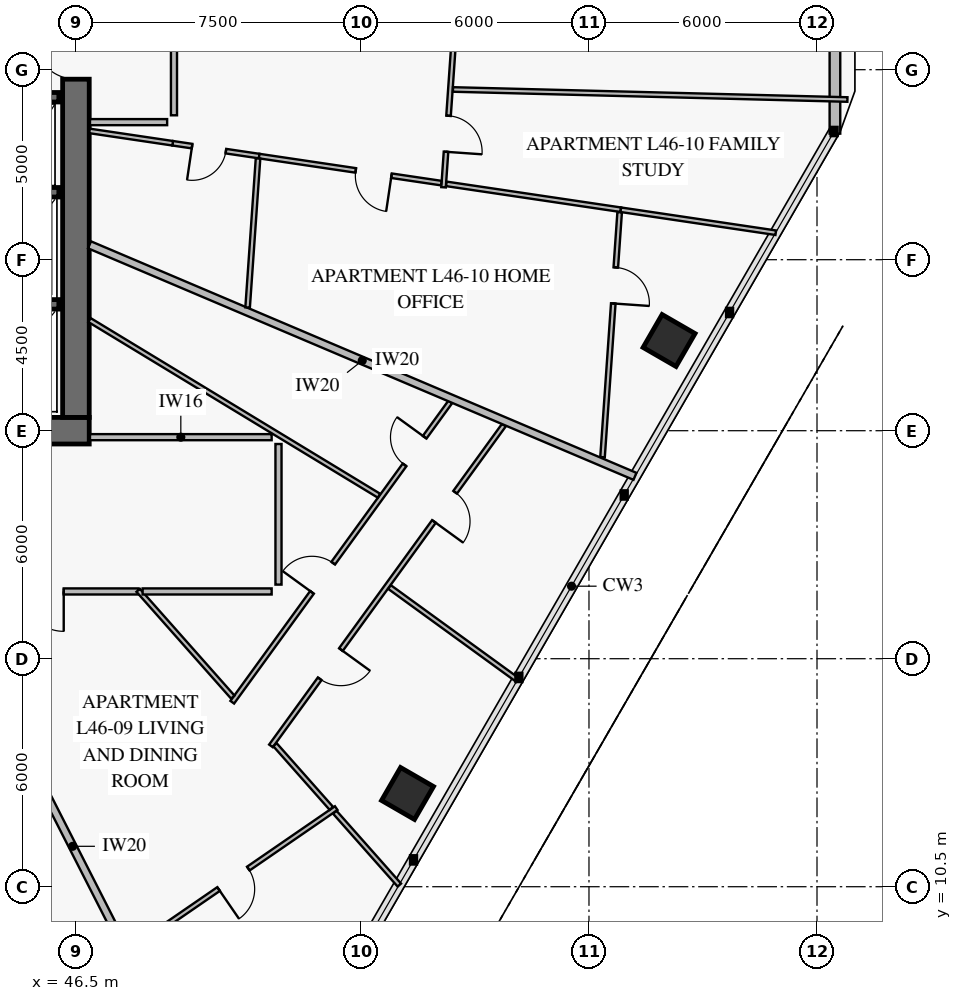
"""IFC4 building model, lengths in metres.
Left out: names, types, materials, properties, quantities, classifications, styles, units other than length and angle.
Written with IfcOpenShell. Run it as: python <this file> out.ifc"""

import sys

from ifc_helpers import new_model, si_unit, direction, frame, frame_2d, origin, origin_2d, place, context, subcontext, project, spatial, rectangle, extrude, element, fill, save


model = new_model("IFC4")
c1 = context("Model", 3, precision=1e-05, world=origin(), true_north=direction((0.0, 1.0)))
c2 = subcontext(c1, "Body", "Model", "MODEL_VIEW")
j1 = project(units=[si_unit("LENGTHUNIT", "METRE"), si_unit("PLANEANGLEUNIT", "RADIAN")], contexts=[c1])
p1 = place(None, origin())
s1 = spatial("IfcSite", under=j1, at=p1, CompositionType="ELEMENT")
p2 = place(p1, origin())
s2 = spatial("IfcBuilding", under=s1, at=p2, CompositionType="ELEMENT")
p3 = place(p2, frame((0.0, 0.0, 184.6)))
s3 = spatial("IfcBuildingStorey", under=s2, at=p3, CompositionType="ELEMENT", Elevation=184.6)
p4 = place(p3, frame((37.35, 22.5, 0.0), z_axis=(0.0, 0.0, 1.0), x_axis=(1.0, 0.0, 0.0)))
e1 = element("IfcWall", 1, at=p4, inside=s3, PredefinedType="SHEAR", context=c2, shape_type="SweptSolid", body=[
    extrude(rectangle(XDim=9.5, YDim=0.7, at=frame_2d((4.75, 0.0))), origin(), (0.0, 0.0, 1.0), 3.8),
])
p5 = place(p4, frame((3.95, 0.0, 0.0)))
e2 = element("IfcOpeningElement", 2, at=p5, cuts=e1, PredefinedType="OPENING", context=c2, shape_type="SweptSolid", body=[
    extrude(rectangle(XDim=1.5, YDim=2.15, at=frame_2d((0.75, 1.075))), frame((0.0, 0.362, 0.0), z_axis=(0.0, -1.0, 0.0), x_axis=(1.0, 0.0, 0.0)), (0.0, 0.0, 1.0), 0.724),
])
p6 = place(p3, frame((46.5, 22.85, 0.0), z_axis=(0.0, 0.0, 1.0), x_axis=(0.0, 1.0, 0.0)))
e3 = element("IfcWall", 3, at=p6, inside=s3, PredefinedType="SHEAR", context=c2, shape_type="SweptSolid", body=[
    extrude(rectangle(XDim=18.3, YDim=0.7, at=frame_2d((9.15, 0.0))), origin(), (0.0, 0.0, 1.0), 3.8),
])
p7 = place(p6, frame((8.9, 0.0, 0.0)))
e4 = element("IfcOpeningElement", 4, at=p7, cuts=e3, PredefinedType="OPENING", context=c2, shape_type="SweptSolid", body=[
    extrude(rectangle(XDim=1.1, YDim=2.15, at=frame_2d((0.55, 1.075))), frame((0.0, 0.362, 0.0), z_axis=(0.0, -1.0, 0.0), x_axis=(1.0, 0.0, 0.0)), (0.0, 0.0, 1.0), 0.724),
])
for number, where, z_axis, x_axis in (
    (5, (55.226, 12.953, 0.0), (0.0, 0.0, 1.0), (0.5, 0.866, 0.0)),
    (6, (62.108, 24.874, 0.0), (0.0, 0.0, 1.0), (0.5, 0.866, 0.0)),
):
    element("IfcColumn", number, at=place(p3, frame(where, z_axis=z_axis, x_axis=x_axis)), inside=s3, PredefinedType="COLUMN", context=c2, shape_type="SweptSolid", body=[
        extrude(rectangle(XDim=1.0, YDim=1.0, at=origin_2d()), origin(), (0.0, 0.0, 1.0), 3.55),
    ])
p8 = place(p3, frame((66.472, 33.683, 0.0), z_axis=(0.0, 0.0, 1.0), x_axis=(0.0, -1.0, 0.0)))
e7 = element("IfcWall", 7, at=p8, inside=s3, PredefinedType="SOLIDWALL", context=c2, shape_type="SweptSolid", body=[
    extrude(rectangle(XDim=3.365, YDim=0.28, at=frame_2d((1.683, 0.0))), origin(), (0.0, 0.0, 1.0), 3.55),
])
p9 = place(p3, frame((25.95, 31.275, 0.0), z_axis=(0.0, 0.0, 1.0), x_axis=(1.0, 0.0, 0.0)))
e8 = element("IfcWall", 8, at=p9, inside=s3, PredefinedType="SOLIDWALL", context=c2, shape_type="SweptSolid", body=[
    extrude(rectangle(XDim=20.1, YDim=0.25, at=frame_2d((10.05, 0.0))), origin(), (0.0, 0.0, 1.0), 3.8),
])
p10 = place(p9, frame((2.6, 0.0, 0.0)))
e9 = element("IfcOpeningElement", 9, at=p10, cuts=e8, PredefinedType="OPENING", context=c2, shape_type="SweptSolid", body=[
    extrude(rectangle(XDim=1.1, YDim=2.15, at=frame_2d((0.55, 1.075))), frame((0.0, 0.137, 0.0), z_axis=(0.0, -1.0, 0.0), x_axis=(1.0, 0.0, 0.0)), (0.0, 0.0, 1.0), 0.274),
])
p11 = place(p9, frame((10.6, 0.0, 0.0)))
e10 = element("IfcOpeningElement", 10, at=p11, cuts=e8, PredefinedType="OPENING", context=c2, shape_type="SweptSolid", body=[
    extrude(rectangle(XDim=1.1, YDim=2.15, at=frame_2d((0.55, 1.075))), frame((0.0, 0.137, 0.0), z_axis=(0.0, -1.0, 0.0), x_axis=(1.0, 0.0, 0.0)), (0.0, 0.0, 1.0), 0.274),
])
p12 = place(p9, frame((16.35, 0.0, 0.0)))
e11 = element("IfcOpeningElement", 11, at=p12, cuts=e8, PredefinedType="OPENING", context=c2, shape_type="SweptSolid", body=[
    extrude(rectangle(XDim=1.1, YDim=2.15, at=frame_2d((0.55, 1.075))), frame((0.0, 0.137, 0.0), z_axis=(0.0, -1.0, 0.0), x_axis=(1.0, 0.0, 0.0)), (0.0, 0.0, 1.0), 0.274),
])
for number, where, z_axis, x_axis in (
    (12, (43.8, 25.825, 0.0), (0.0, 0.0, 1.0), (1.0, 0.0, 0.0)),
    (13, (43.8, 28.775, 0.0), (0.0, 0.0, 1.0), (1.0, 0.0, 0.0)),
):
    element("IfcWall", number, at=place(p3, frame(where, z_axis=z_axis, x_axis=x_axis)), inside=s3, PredefinedType="SOLIDWALL", context=c2, shape_type="SweptSolid", body=[
        extrude(rectangle(XDim=2.25, YDim=0.25, at=frame_2d((1.125, 0.0))), origin(), (0.0, 0.0, 1.0), 3.8),
    ])
p13 = place(p3, frame((47.94, 8.847, 0.0), z_axis=(0.0, 0.0, 1.0), x_axis=(0.823925822712, 0.566697660723, 0.0)))
e14 = element("IfcWall", 14, at=p13, inside=s3, PredefinedType="PARTITIONING", context=c2, shape_type="SweptSolid", body=[
    extrude(rectangle(XDim=6.566, YDim=0.12, at=frame_2d((3.283, 0.0))), origin(), (0.0, 0.0, 1.0), 2.87),
])
p14 = place(p13, frame((2.808, 0.0, 0.0)))
e15 = element("IfcOpeningElement", 15, at=p14, cuts=e14, PredefinedType="OPENING", context=c2, shape_type="SweptSolid", body=[
    extrude(rectangle(XDim=0.95, YDim=2.1, at=frame_2d((0.475, 1.05))), frame((0.0, 0.072, 0.0), z_axis=(0.0, -1.0, 0.0), x_axis=(1.0, 0.0, 0.0)), (0.0, 0.0, 1.0), 0.144),
])
p15 = place(p3, frame((50.613, 15.355, 0.0), z_axis=(0.0, 0.0, 1.0), x_axis=(0.587519111836, 0.809210289867, 0.0)))
e16 = element("IfcWall", 16, at=p15, inside=s3, PredefinedType="PARTITIONING", context=c2, shape_type="SweptSolid", body=[
    extrude(rectangle(XDim=9.768, YDim=0.12, at=frame_2d((4.884, 0.0))), origin(), (0.0, 0.0, 1.0), 2.9),
])
p16 = place(p15, frame((3.572, 0.0, 0.0)))
e17 = element("IfcOpeningElement", 17, at=p16, cuts=e16, PredefinedType="OPENING", context=c2, shape_type="SweptSolid", body=[
    extrude(rectangle(XDim=0.95, YDim=2.1, at=frame_2d((0.475, 1.05))), frame((0.0, 0.072, 0.0), z_axis=(0.0, -1.0, 0.0), x_axis=(1.0, 0.0, 0.0)), (0.0, 0.0, 1.0), 0.144),
])
p17 = place(p15, frame((7.719, 0.0, 0.0)))
e18 = element("IfcOpeningElement", 18, at=p17, cuts=e16, PredefinedType="OPENING", context=c2, shape_type="SweptSolid", body=[
    extrude(rectangle(XDim=0.9, YDim=2.1, at=frame_2d((0.45, 1.05))), frame((0.0, 0.072, 0.0), z_axis=(0.0, -1.0, 0.0), x_axis=(1.0, 0.0, 0.0)), (0.0, 0.0, 1.0), 0.144),
])
p18 = place(p3, frame((51.632, 14.205, 0.0), z_axis=(0.0, 0.0, 1.0), x_axis=(0.587503568884, 0.809221574446, 0.0)))
e19 = element("IfcWall", 19, at=p18, inside=s3, PredefinedType="PARTITIONING", context=c2, shape_type="SweptSolid", body=[
    extrude(rectangle(XDim=10.432, YDim=0.12, at=frame_2d((5.216, 0.0))), origin(), (0.0, 0.0, 1.0), 2.9),
])
p19 = place(p18, frame((2.183, 0.0, 0.0)))
e20 = element("IfcOpeningElement", 20, at=p19, cuts=e19, PredefinedType="OPENING", context=c2, shape_type="SweptSolid", body=[
    extrude(rectangle(XDim=0.95, YDim=2.1, at=frame_2d((0.475, 1.05))), frame((0.0, 0.072, 0.0), z_axis=(0.0, -1.0, 0.0), x_axis=(1.0, 0.0, 0.0)), (0.0, 0.0, 1.0), 0.144),
])
p20 = place(p18, frame((7.299, 0.0, 0.0)))
e21 = element("IfcOpeningElement", 21, at=p20, cuts=e19, PredefinedType="OPENING", context=c2, shape_type="SweptSolid", body=[
    extrude(rectangle(XDim=0.95, YDim=2.1, at=frame_2d((0.475, 1.05))), frame((0.0, 0.072, 0.0), z_axis=(0.0, -1.0, 0.0), x_axis=(1.0, 0.0, 0.0)), (0.0, 0.0, 1.0), 0.144),
])
p21 = place(p3, frame((43.17, 18.27, 0.0), z_axis=(0.0, 0.0, 1.0), x_axis=(1.0, 0.0, 0.0)))
e22 = element("IfcWall", 22, at=p21, inside=s3, PredefinedType="PARTITIONING", context=c2, shape_type="SweptSolid", body=[
    extrude(rectangle(XDim=4.968, YDim=0.16, at=frame_2d((2.484, 0.0))), origin(), (0.0, 0.0, 1.0), 3.55),
])
p22 = place(p21, frame((1.959, 0.0, 0.0)))
e23 = element("IfcOpeningElement", 23, at=p22, cuts=e22, PredefinedType="OPENING", context=c2, shape_type="SweptSolid", body=[
    extrude(rectangle(XDim=1.05, YDim=2.15, at=frame_2d((0.525, 1.075))), frame((0.0, 0.092, 0.0), z_axis=(0.0, -1.0, 0.0), x_axis=(1.0, 0.0, 0.0)), (0.0, 0.0, 1.0), 0.184),
])
p23 = place(p3, frame((56.173, 28.906, 0.0), z_axis=(0.0, 0.0, 1.0), x_axis=(0.069768607492, 0.997563201711, 0.0)))
e24 = element("IfcWall", 24, at=p23, inside=s3, PredefinedType="PARTITIONING", context=c2, shape_type="SweptSolid", body=[
    extrude(rectangle(XDim=8.591, YDim=0.12, at=frame_2d((4.295, 0.0))), origin(), (0.0, 0.0, 1.0), 3.55),
])
p24 = place(p23, frame((0.936, 0.0, 0.0)))
e25 = element("IfcOpeningElement", 25, at=p24, cuts=e24, PredefinedType="OPENING", context=c2, shape_type="SweptSolid", body=[
    extrude(rectangle(XDim=0.95, YDim=2.1, at=frame_2d((0.475, 1.05))), frame((0.0, 0.072, 0.0), z_axis=(0.0, -1.0, 0.0), x_axis=(1.0, 0.0, 0.0)), (0.0, 0.0, 1.0), 0.144),
])
p25 = place(p23, frame((4.991, 0.0, 0.0)))
e26 = element("IfcOpeningElement", 26, at=p25, cuts=e24, PredefinedType="OPENING", context=c2, shape_type="SweptSolid", body=[
    extrude(rectangle(XDim=0.95, YDim=2.1, at=frame_2d((0.475, 1.05))), frame((0.0, 0.072, 0.0), z_axis=(0.0, -1.0, 0.0), x_axis=(1.0, 0.0, 0.0)), (0.0, 0.0, 1.0), 0.144),
])
p26 = place(p3, frame((49.045, 30.064, 0.0), z_axis=(0.0, 0.0, 1.0), x_axis=(0.989173245812, -0.146752477897, 0.0)))
e27 = element("IfcWall", 27, at=p26, inside=s3, PredefinedType="PARTITIONING", context=c2, shape_type="SweptSolid", body=[
    extrude(rectangle(XDim=2.301, YDim=0.12, at=frame_2d((1.15, 0.0))), origin(), (0.0, 0.0, 1.0), 3.55),
])
p27 = place(p26, frame((0.516, 0.0, 0.0)))
e28 = element("IfcOpeningElement", 28, at=p27, cuts=e27, PredefinedType="OPENING", context=c2, shape_type="SweptSolid", body=[
    extrude(rectangle(XDim=0.9, YDim=2.1, at=frame_2d((0.45, 1.05))), frame((0.0, 0.072, 0.0), z_axis=(0.0, -1.0, 0.0), x_axis=(1.0, 0.0, 0.0)), (0.0, 0.0, 1.0), 0.144),
])
p28 = place(p3, frame((51.321, 29.727, 0.0), z_axis=(0.0, 0.0, 1.0), x_axis=(0.98916147346, -0.146831806573, 0.0)))
e29 = element("IfcWall", 29, at=p28, inside=s3, PredefinedType="PARTITIONING", context=c2, shape_type="SweptSolid", body=[
    extrude(rectangle(XDim=4.844, YDim=0.12, at=frame_2d((2.422, 0.0))), origin(), (0.0, 0.0, 1.0), 3.55),
])
p29 = place(p28, frame((2.569, 0.0, 0.0)))
e30 = element("IfcOpeningElement", 30, at=p29, cuts=e29, PredefinedType="OPENING", context=c2, shape_type="SweptSolid", body=[
    extrude(rectangle(XDim=0.95, YDim=2.1, at=frame_2d((0.475, 1.05))), frame((0.0, 0.072, 0.0), z_axis=(0.0, -1.0, 0.0), x_axis=(1.0, 0.0, 0.0)), (0.0, 0.0, 1.0), 0.144),
])
p30 = place(p3, frame((56.247, 28.996, 0.0), z_axis=(0.0, 0.0, 1.0), x_axis=(0.989173212218, -0.146752704339, 0.0)))
e31 = element("IfcWall", 31, at=p30, inside=s3, PredefinedType="PARTITIONING", context=c2, shape_type="SweptSolid", body=[
    extrude(rectangle(XDim=4.64, YDim=0.12, at=frame_2d((2.32, 0.0))), origin(), (0.0, 0.0, 1.0), 3.55),
])
p31 = place(p3, frame((60.356, 21.803, 0.0), z_axis=(0.0, 0.0, 1.0), x_axis=(0.069770485872, 0.997563070337, 0.0)))
e32 = element("IfcWall", 32, at=p31, inside=s3, PredefinedType="PARTITIONING", context=c2, shape_type="SweptSolid", body=[
    extrude(rectangle(XDim=6.463, YDim=0.12, at=frame_2d((3.231, 0.0))), origin(), (0.0, 0.0, 1.0), 2.87),
])
p32 = place(p31, frame((4.055, 0.0, 0.0)))
e33 = element("IfcOpeningElement", 33, at=p32, cuts=e32, PredefinedType="OPENING", context=c2, shape_type="SweptSolid", body=[
    extrude(rectangle(XDim=0.95, YDim=2.1, at=frame_2d((0.475, 1.05))), frame((0.0, 0.072, 0.0), z_axis=(0.0, -1.0, 0.0), x_axis=(1.0, 0.0, 0.0)), (0.0, 0.0, 1.0), 0.144),
])
p33 = place(p3, frame((49.08, 30.8, 0.0), z_axis=(0.0, 0.0, 1.0), x_axis=(0.0, 1.0, 0.0)))
e34 = element("IfcWall", 34, at=p33, inside=s3, PredefinedType="PARTITIONING", context=c2, shape_type="SweptSolid", body=[
    extrude(rectangle(XDim=4.562, YDim=0.16, at=frame_2d((2.281, 0.0))), origin(), (0.0, 0.0, 1.0), 3.55),
])
p34 = place(p33, frame((1.756, 0.0, 0.0)))
e35 = element("IfcOpeningElement", 35, at=p34, cuts=e34, PredefinedType="OPENING", context=c2, shape_type="SweptSolid", body=[
    extrude(rectangle(XDim=1.05, YDim=2.15, at=frame_2d((0.525, 1.075))), frame((0.0, 0.092, 0.0), z_axis=(0.0, -1.0, 0.0), x_axis=(1.0, 0.0, 0.0)), (0.0, 0.0, 1.0), 0.184),
])
p35 = place(p3, frame((42.975, 18.31, 0.0), z_axis=(0.0, 0.0, 1.0), x_axis=(0.453997506489, -0.891002954037, 0.0)))
e36 = element("IfcWall", 36, at=p35, inside=s3, PredefinedType="PARTITIONING", context=c2, shape_type="SweptSolid", body=[
    extrude(rectangle(XDim=15.144, YDim=0.2, at=frame_2d((7.572, 0.0))), origin(), (0.0, 0.0, 1.0), 2.87),
])
p36 = place(p3, frame((46.858, 25.411, 0.0), z_axis=(0.0, 0.0, 1.0), x_axis=(0.854916867304, -0.518765023878, 0.0)))
e37 = element("IfcWall", 37, at=p36, inside=s3, PredefinedType="PARTITIONING", context=c2, shape_type="SweptSolid", body=[
    extrude(rectangle(XDim=8.909, YDim=0.12, at=frame_2d((4.455, 0.0))), origin(), (0.0, 0.0, 1.0), 3.15),
])
p37 = place(p3, frame((54.752, 18.386, 0.0), z_axis=(0.0, 0.0, 1.0), x_axis=(0.809234621537, -0.587485597531, 0.0)))
e38 = element("IfcWall", 38, at=p37, inside=s3, PredefinedType="PARTITIONING", context=c2, shape_type="SweptSolid", body=[
    extrude(rectangle(XDim=4.169, YDim=0.12, at=frame_2d((2.085, 0.0))), origin(), (0.0, 0.0, 1.0), 2.87),
])
p38 = place(p3, frame((48.138, 18.3, 0.0), z_axis=(0.0, 0.0, 1.0), x_axis=(0.663123743862, -0.748509786393, 0.0)))
e39 = element("IfcWall", 39, at=p38, inside=s3, PredefinedType="PARTITIONING", context=c2, shape_type="SweptSolid", body=[
    extrude(rectangle(XDim=3.754, YDim=0.12, at=frame_2d((1.877, 0.0))), origin(), (0.0, 0.0, 1.0), 3.55),
])
p39 = place(p3, frame((51.739, 14.236, 0.0), z_axis=(0.0, 0.0, 1.0), x_axis=(0.663176854864, -0.74846273065, 0.0)))
e40 = element("IfcWall", 40, at=p39, inside=s3, PredefinedType="PARTITIONING", context=c2, shape_type="SweptSolid", body=[
    extrude(rectangle(XDim=2.236, YDim=0.12, at=frame_2d((1.118, 0.0))), origin(), (0.0, 0.0, 1.0), 3.55),
])
p40 = place(p3, frame((53.312, 12.46, 0.0), z_axis=(0.0, 0.0, 1.0), x_axis=(0.663102409331, -0.748528686651, 0.0)))
e41 = element("IfcWall", 41, at=p40, inside=s3, PredefinedType="PARTITIONING", context=c2, shape_type="SweptSolid", body=[
    extrude(rectangle(XDim=2.561, YDim=0.12, at=frame_2d((1.28, 0.0))), origin(), (0.0, 0.0, 1.0), 2.87),
])
p41 = place(p3, frame((46.858, 27.391, 0.0), z_axis=(0.0, 0.0, 1.0), x_axis=(0.920508238271, -0.390723154261, 0.0)))
e42 = element("IfcWall", 42, at=p41, inside=s3, PredefinedType="PARTITIONING", context=c2, shape_type="SweptSolid", body=[
    extrude(rectangle(XDim=15.592, YDim=0.2, at=frame_2d((7.796, 0.0))), origin(), (0.0, 0.0, 1.0), 2.87),
])
p42 = place(p3, frame((56.421, 31.48, 0.0), z_axis=(0.0, 0.0, 1.0), x_axis=(0.999675097587, -0.025489198988, 0.0)))
e43 = element("IfcWall", 43, at=p42, inside=s3, PredefinedType="PARTITIONING", context=c2, shape_type="SweptSolid", body=[
    extrude(rectangle(XDim=10.383, YDim=0.12, at=frame_2d((5.191, 0.0))), origin(), (0.0, 0.0, 1.0), 2.87),
])
p43 = place(p3, frame((46.858, 30.389, 0.0), z_axis=(0.0, 0.0, 1.0), x_axis=(0.989161931015, -0.146828724135, 0.0)))
e44 = element("IfcWall", 44, at=p43, inside=s3, PredefinedType="PARTITIONING", context=c2, shape_type="SweptSolid", body=[
    extrude(rectangle(XDim=2.211, YDim=0.12, at=frame_2d((1.106, 0.0))), origin(), (0.0, 0.0, 1.0), 3.55),
])
p44 = place(p3, frame((60.837, 28.315, 0.0), z_axis=(0.0, 0.0, 1.0), x_axis=(0.989174828163, -0.146741811793, 0.0)))
e45 = element("IfcWall", 45, at=p44, inside=s3, PredefinedType="PARTITIONING", context=c2, shape_type="SweptSolid", body=[
    extrude(rectangle(XDim=4.123, YDim=0.12, at=frame_2d((2.062, 0.0))), origin(), (0.0, 0.0, 1.0), 2.87),
])
p45 = place(p3, frame((51.018, 25.743, 0.0), z_axis=(0.0, 0.0, 1.0), x_axis=(0.069719060605, 0.997566665736, 0.0)))
e46 = element("IfcWall", 46, at=p45, inside=s3, PredefinedType="PARTITIONING", context=c2, shape_type="SweptSolid", body=[
    extrude(rectangle(XDim=3.929, YDim=0.12, at=frame_2d((1.964, 0.0))), origin(), (0.0, 0.0, 1.0), 2.9),
])
p46 = place(p3, frame((51.65, 22.33, 0.0), z_axis=(0.0, 0.0, 1.0), x_axis=(-1.0, 0.0, 0.0)))
e47 = element("IfcWall", 47, at=p46, inside=s3, PredefinedType="PARTITIONING", context=c2, shape_type="SweptSolid", body=[
    extrude(rectangle(XDim=4.78, YDim=0.16, at=frame_2d((2.39, 0.0))), origin(), (0.0, 0.0, 1.0), 3.55),
])
p47 = place(p3, frame((51.83, 18.45, 0.0), z_axis=(0.0, 0.0, 1.0), x_axis=(0.0, 1.0, 0.0)))
e48 = element("IfcWall", 48, at=p47, inside=s3, PredefinedType="PARTITIONING", context=c2, shape_type="SweptSolid", body=[
    extrude(rectangle(XDim=3.7, YDim=0.16, at=frame_2d((1.85, 0.0))), origin(), (0.0, 0.0, 1.0), 3.15),
])
p48 = place(p3, frame((48.255, 18.27, 0.0), z_axis=(0.0, 0.0, 1.0), x_axis=(1.0, 0.0, 0.0)))
e49 = element("IfcWall", 49, at=p48, inside=s3, PredefinedType="PARTITIONING", context=c2, shape_type="SweptSolid", body=[
    extrude(rectangle(XDim=3.395, YDim=0.16, at=frame_2d((1.697, 0.0))), origin(), (0.0, 0.0, 1.0), 2.9),
])
p49 = place(p3, frame((46.87, 30.62, 0.0), z_axis=(0.0, 0.0, 1.0), x_axis=(1.0, 0.0, 0.0)))
e50 = element("IfcWall", 50, at=p49, inside=s3, PredefinedType="PARTITIONING", context=c2, shape_type="SweptSolid", body=[
    extrude(rectangle(XDim=2.03, YDim=0.16, at=frame_2d((1.015, 0.0))), origin(), (0.0, 0.0, 1.0), 3.55),
])
p50 = place(p7, origin())
e51 = element("IfcDoor", 51, at=p50, inside=s3, OperationType="SINGLE_SWING_RIGHT", PredefinedType="USERDEFINED", context=c2, shape_type="SweptSolid", body=[
    extrude(rectangle(XDim=1.1, YDim=2.15, at=frame_2d((0.55, 1.075))), frame((0.0, 0.025, 0.0), z_axis=(0.0, -1.0, 0.0), x_axis=(1.0, 0.0, 0.0)), (0.0, 0.0, 1.0), 0.05),
])
fill(e4, e51)
p51 = place(p14, frame((0.95, 0.0, 0.0), z_axis=(0.0, 0.0, 1.0), x_axis=(-1.0, 0.0, 0.0)))
e52 = element("IfcDoor", 52, at=p51, inside=s3, OperationType="SINGLE_SWING_RIGHT", PredefinedType="DOOR", context=c2, shape_type="SweptSolid", body=[
    extrude(rectangle(XDim=0.95, YDim=2.1, at=frame_2d((0.475, 1.05))), frame((0.0, 0.025, 0.0), z_axis=(0.0, -1.0, 0.0), x_axis=(1.0, 0.0, 0.0)), (0.0, 0.0, 1.0), 0.05),
])
fill(e15, e52)
p52 = place(p16, origin())
e53 = element("IfcDoor", 53, at=p52, inside=s3, OperationType="SINGLE_SWING_LEFT", PredefinedType="DOOR", context=c2, shape_type="SweptSolid", body=[
    extrude(rectangle(XDim=0.95, YDim=2.1, at=frame_2d((0.475, 1.05))), frame((0.0, 0.025, 0.0), z_axis=(0.0, -1.0, 0.0), x_axis=(1.0, 0.0, 0.0)), (0.0, 0.0, 1.0), 0.05),
])
fill(e17, e53)
p53 = place(p17, origin())
e54 = element("IfcDoor", 54, at=p53, inside=s3, OperationType="SINGLE_SWING_RIGHT", PredefinedType="DOOR", context=c2, shape_type="SweptSolid", body=[
    extrude(rectangle(XDim=0.9, YDim=2.1, at=frame_2d((0.45, 1.05))), frame((0.0, 0.025, 0.0), z_axis=(0.0, -1.0, 0.0), x_axis=(1.0, 0.0, 0.0)), (0.0, 0.0, 1.0), 0.05),
])
fill(e18, e54)
p54 = place(p19, frame((0.95, 0.0, 0.0), z_axis=(0.0, 0.0, 1.0), x_axis=(-1.0, 0.0, 0.0)))
e55 = element("IfcDoor", 55, at=p54, inside=s3, OperationType="SINGLE_SWING_LEFT", PredefinedType="DOOR", context=c2, shape_type="SweptSolid", body=[
    extrude(rectangle(XDim=0.95, YDim=2.1, at=frame_2d((0.475, 1.05))), frame((0.0, 0.025, 0.0), z_axis=(0.0, -1.0, 0.0), x_axis=(1.0, 0.0, 0.0)), (0.0, 0.0, 1.0), 0.05),
])
fill(e20, e55)
p55 = place(p20, frame((0.95, 0.0, 0.0), z_axis=(0.0, 0.0, 1.0), x_axis=(-1.0, 0.0, 0.0)))
e56 = element("IfcDoor", 56, at=p55, inside=s3, OperationType="SINGLE_SWING_RIGHT", PredefinedType="DOOR", context=c2, shape_type="SweptSolid", body=[
    extrude(rectangle(XDim=0.95, YDim=2.1, at=frame_2d((0.475, 1.05))), frame((0.0, 0.025, 0.0), z_axis=(0.0, -1.0, 0.0), x_axis=(1.0, 0.0, 0.0)), (0.0, 0.0, 1.0), 0.05),
])
fill(e21, e56)
p56 = place(p22, frame((1.05, 0.0, 0.0), z_axis=(0.0, 0.0, 1.0), x_axis=(-1.0, 0.0, 0.0)))
e57 = element("IfcDoor", 57, at=p56, inside=s3, OperationType="SINGLE_SWING_LEFT", PredefinedType="DOOR", context=c2, shape_type="SweptSolid", body=[
    extrude(rectangle(XDim=1.05, YDim=2.15, at=frame_2d((0.525, 1.075))), frame((0.0, 0.025, 0.0), z_axis=(0.0, -1.0, 0.0), x_axis=(1.0, 0.0, 0.0)), (0.0, 0.0, 1.0), 0.05),
])
fill(e23, e57)
p57 = place(p24, frame((0.95, 0.0, 0.0), z_axis=(0.0, 0.0, 1.0), x_axis=(-1.0, 0.0, 0.0)))
e58 = element("IfcDoor", 58, at=p57, inside=s3, OperationType="SINGLE_SWING_RIGHT", PredefinedType="DOOR", context=c2, shape_type="SweptSolid", body=[
    extrude(rectangle(XDim=0.95, YDim=2.1, at=frame_2d((0.475, 1.05))), frame((0.0, 0.025, 0.0), z_axis=(0.0, -1.0, 0.0), x_axis=(1.0, 0.0, 0.0)), (0.0, 0.0, 1.0), 0.05),
])
fill(e25, e58)
p58 = place(p27, frame((0.9, 0.0, 0.0), z_axis=(0.0, 0.0, 1.0), x_axis=(-1.0, 0.0, 0.0)))
e59 = element("IfcDoor", 59, at=p58, inside=s3, OperationType="SINGLE_SWING_RIGHT", PredefinedType="DOOR", context=c2, shape_type="SweptSolid", body=[
    extrude(rectangle(XDim=0.9, YDim=2.1, at=frame_2d((0.45, 1.05))), frame((0.0, 0.025, 0.0), z_axis=(0.0, -1.0, 0.0), x_axis=(1.0, 0.0, 0.0)), (0.0, 0.0, 1.0), 0.05),
])
fill(e28, e59)
p59 = place(p29, frame((0.95, 0.0, 0.0), z_axis=(0.0, 0.0, 1.0), x_axis=(-1.0, 0.0, 0.0)))
e60 = element("IfcDoor", 60, at=p59, inside=s3, OperationType="SINGLE_SWING_LEFT", PredefinedType="DOOR", context=c2, shape_type="SweptSolid", body=[
    extrude(rectangle(XDim=0.95, YDim=2.1, at=frame_2d((0.475, 1.05))), frame((0.0, 0.025, 0.0), z_axis=(0.0, -1.0, 0.0), x_axis=(1.0, 0.0, 0.0)), (0.0, 0.0, 1.0), 0.05),
])
fill(e30, e60)
p60 = place(p32, frame((0.95, 0.0, 0.0), z_axis=(0.0, 0.0, 1.0), x_axis=(-1.0, 0.0, 0.0)))
e61 = element("IfcDoor", 61, at=p60, inside=s3, OperationType="SINGLE_SWING_RIGHT", PredefinedType="DOOR", context=c2, shape_type="SweptSolid", body=[
    extrude(rectangle(XDim=0.95, YDim=2.1, at=frame_2d((0.475, 1.05))), frame((0.0, 0.025, 0.0), z_axis=(0.0, -1.0, 0.0), x_axis=(1.0, 0.0, 0.0)), (0.0, 0.0, 1.0), 0.05),
])
fill(e33, e61)
save(model, sys.argv[1])
